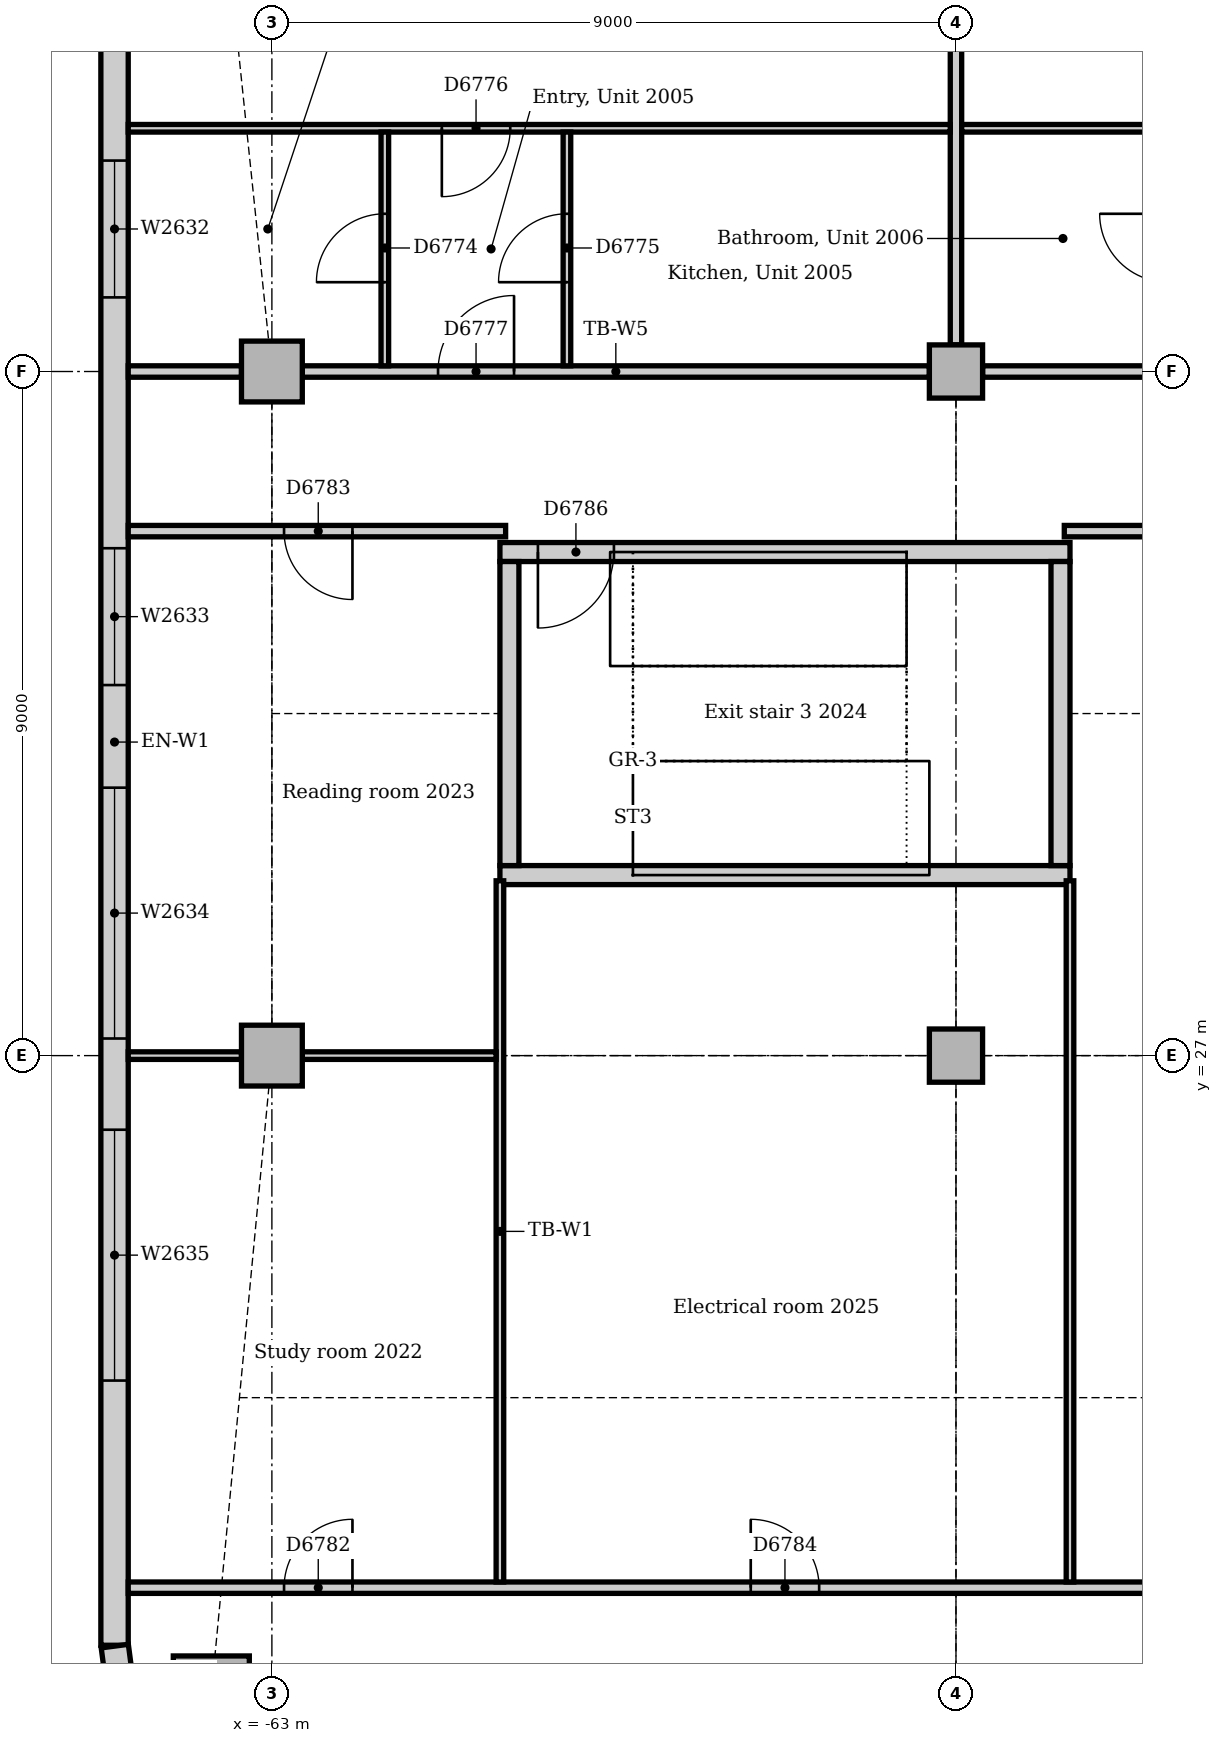
"""IFC4 building model, lengths in metres.
Left out: names, types, materials, properties, quantities, classifications, styles, units other than length and angle.
Written with IfcOpenShell. Run it as: python <this file> out.ifc"""

import sys

from ifc_helpers import new_model, si_unit, direction, frame, frame_2d, origin, origin_2d, place, context, subcontext, project, spatial, rectangle, extrude, element, fill, save


model = new_model("IFC4")
c1 = context("Model", 3, precision=1e-05, world=origin(), true_north=direction((0.0, 1.0)))
c2 = subcontext(c1, "Body", "Model", "MODEL_VIEW")
j1 = project(units=[si_unit("LENGTHUNIT", "METRE"), si_unit("PLANEANGLEUNIT", "RADIAN")], contexts=[c1])
p1 = place(None, origin())
s1 = spatial("IfcSite", under=j1, at=p1, CompositionType="ELEMENT")
p2 = place(p1, origin())
s2 = spatial("IfcBuilding", under=s1, at=p2, CompositionType="ELEMENT")
p3 = place(p2, frame((0.0, 0.0, 87.0)))
s3 = spatial("IfcBuildingStorey", under=s2, at=p3, CompositionType="ELEMENT", Elevation=87.0)
p4 = place(p3, frame((-60.0, 29.375, 0.0), z_axis=(0.0, 0.0, 1.0), x_axis=(1.0, 0.0, 0.0)))
e1 = element("IfcWall", 1, at=p4, inside=s3, PredefinedType="SOLIDWALL", context=c2, shape_type="SweptSolid", body=[
    extrude(rectangle(XDim=7.5, YDim=0.25, at=frame_2d((3.75, 0.0))), origin(), (0.0, 0.0, 1.0), 4.0),
])
p5 = place(p3, frame((-52.5, 33.625, 0.0), z_axis=(0.0, 0.0, 1.0), x_axis=(-1.0, 0.0, 0.0)))
e2 = element("IfcWall", 2, at=p5, inside=s3, PredefinedType="SOLIDWALL", context=c2, shape_type="SweptSolid", body=[
    extrude(rectangle(XDim=7.5, YDim=0.25, at=frame_2d((3.75, 0.0))), origin(), (0.0, 0.0, 1.0), 4.0),
])
p6 = place(p5, frame((6.0, 0.0, 0.0)))
e3 = element("IfcOpeningElement", 3, at=p6, cuts=e2, PredefinedType="OPENING", context=c2, shape_type="SweptSolid", body=[
    extrude(rectangle(XDim=1.0, YDim=2.1, at=frame_2d((0.5, 1.05))), frame((0.0, 0.135, 0.0), z_axis=(0.0, -1.0, 0.0), x_axis=(1.0, 0.0, 0.0)), (0.0, 0.0, 1.0), 0.27),
])
for number, where, z_axis, x_axis in (
    (4, (-52.625, 29.5, 0.0), (0.0, 0.0, 1.0), (0.0, 1.0, 0.0)),
    (5, (-59.875, 33.5, 0.0), (0.0, 0.0, 1.0), (0.0, -1.0, 0.0)),
):
    element("IfcWall", number, at=place(p3, frame(where, z_axis=z_axis, x_axis=x_axis)), inside=s3, PredefinedType="SOLIDWALL", context=c2, shape_type="SweptSolid", body=[
        extrude(rectangle(XDim=4.0, YDim=0.25, at=frame_2d((2.0, 0.0))), origin(), (0.0, 0.0, 1.0), 4.0),
    ])
p7 = place(p3, frame((-63.797, 18.602, 0.0), z_axis=(0.0, 0.0, 1.0), x_axis=(1.0, 0.0, 0.0)))
e6 = element("IfcColumn", 6, at=p7, inside=s3, PredefinedType="COLUMN", context=c2, shape_type="SweptSolid", body=[
    extrude(rectangle(XDim=1.0, YDim=1.0, at=origin_2d()), origin(), (0.0, 0.0, 1.0), 3.85),
])
for number, where, z_axis, x_axis in (
    (7, (-63.0, 27.0, 0.0), (0.0, 0.0, 1.0), (1.0, 0.0, 0.0)),
    (8, (-63.0, 36.0, 0.0), (0.0, 0.0, 1.0), (1.0, 0.0, 0.0)),
):
    element("IfcColumn", number, at=place(p3, frame(where, z_axis=z_axis, x_axis=x_axis)), inside=s3, PredefinedType="COLUMN", context=c2, shape_type="SweptSolid", body=[
        extrude(rectangle(XDim=0.8, YDim=0.8, at=origin_2d()), origin(), (0.0, 0.0, 1.0), 3.85),
    ])
for number, where, z_axis, x_axis in (
    (9, (-54.0, 27.0, 0.0), (0.0, 0.0, 1.0), (1.0, 0.0, 0.0)),
    (10, (-54.0, 36.0, 0.0), (0.0, 0.0, 1.0), (1.0, 0.0, 0.0)),
):
    element("IfcColumn", number, at=place(p3, frame(where, z_axis=z_axis, x_axis=x_axis)), inside=s3, PredefinedType="COLUMN", context=c2, shape_type="SweptSolid", body=[
        extrude(rectangle(XDim=0.7, YDim=0.7, at=origin_2d()), origin(), (0.0, 0.0, 1.0), 3.85),
    ])
p8 = place(p3, frame((-65.07, 43.007, 0.0), z_axis=(0.0, 0.0, 1.0), x_axis=(0.0, -1.0, 0.0)))
e11 = element("IfcWall", 11, at=p8, inside=s3, PredefinedType="STANDARD", context=c2, shape_type="SweptSolid", body=[
    extrude(rectangle(XDim=23.765, YDim=0.36, at=frame_2d((11.882, 0.0))), origin(), (0.0, 0.0, 1.0), 3.85),
])
p9 = place(p8, frame((4.232, 0.0, 0.9)))
e12 = element("IfcOpeningElement", 12, at=p9, cuts=e11, PredefinedType="OPENING", context=c2, shape_type="SweptSolid", body=[
    extrude(rectangle(XDim=1.8, YDim=1.6, at=frame_2d((0.9, 0.8))), frame((0.0, 0.19, 0.0), z_axis=(0.0, -1.0, 0.0), x_axis=(1.0, 0.0, 0.0)), (0.0, 0.0, 1.0), 0.38),
])
p10 = place(p8, frame((9.332, 0.0, 0.9)))
e13 = element("IfcOpeningElement", 13, at=p10, cuts=e11, PredefinedType="OPENING", context=c2, shape_type="SweptSolid", body=[
    extrude(rectangle(XDim=1.8, YDim=1.6, at=frame_2d((0.9, 0.8))), frame((0.0, 0.19, 0.0), z_axis=(0.0, -1.0, 0.0), x_axis=(1.0, 0.0, 0.0)), (0.0, 0.0, 1.0), 0.38),
])
p11 = place(p8, frame((12.482, 0.0, 0.9)))
e14 = element("IfcOpeningElement", 14, at=p11, cuts=e11, PredefinedType="OPENING", context=c2, shape_type="SweptSolid", body=[
    extrude(rectangle(XDim=3.3, YDim=1.6, at=frame_2d((1.65, 0.8))), frame((0.0, 0.19, 0.0), z_axis=(0.0, -1.0, 0.0), x_axis=(1.0, 0.0, 0.0)), (0.0, 0.0, 1.0), 0.38),
])
p12 = place(p8, frame((16.982, 0.0, 0.9)))
e15 = element("IfcOpeningElement", 15, at=p12, cuts=e11, PredefinedType="OPENING", context=c2, shape_type="SweptSolid", body=[
    extrude(rectangle(XDim=3.3, YDim=1.6, at=frame_2d((1.65, 0.8))), frame((0.0, 0.19, 0.0), z_axis=(0.0, -1.0, 0.0), x_axis=(1.0, 0.0, 0.0)), (0.0, 0.0, 1.0), 0.38),
])
p13 = place(p3, frame((-65.067, 19.231, 0.0), z_axis=(0.0, 0.0, 1.0), x_axis=(0.13055608231, -0.99144092581, 0.0)))
e16 = element("IfcWall", 16, at=p13, inside=s3, PredefinedType="STANDARD", context=c2, shape_type="SweptSolid", body=[
    extrude(rectangle(XDim=0.713, YDim=0.36, at=frame_2d((0.356, 0.0))), origin(), (0.0, 0.0, 1.0), 3.85),
])
p14 = place(p3, frame((-53.65, 36.0, 0.0), z_axis=(0.0, 0.0, 1.0), x_axis=(1.0, 0.0, 0.0)))
e17 = element("IfcWall", 17, at=p14, inside=s3, PredefinedType="PARTITIONING", context=c2, shape_type="SweptSolid", body=[
    extrude(rectangle(XDim=8.3, YDim=0.15, at=frame_2d((4.15, 0.0))), origin(), (0.0, 0.0, 1.0), 3.158),
])
p15 = place(p14, frame((2.94, 0.0, 0.0)))
e18 = element("IfcOpeningElement", 18, at=p15, cuts=e17, PredefinedType="OPENING", context=c2, shape_type="SweptSolid", body=[
    extrude(rectangle(XDim=1.0, YDim=2.1, at=frame_2d((0.5, 1.05))), frame((0.0, 0.085, 0.0), z_axis=(0.0, -1.0, 0.0), x_axis=(1.0, 0.0, 0.0)), (0.0, 0.0, 1.0), 0.17),
])
p16 = place(p3, frame((-62.6, 36.0, 0.0), z_axis=(0.0, 0.0, 1.0), x_axis=(1.0, 0.0, 0.0)))
e19 = element("IfcWall", 19, at=p16, inside=s3, PredefinedType="PARTITIONING", context=c2, shape_type="SweptSolid", body=[
    extrude(rectangle(XDim=8.25, YDim=0.15, at=frame_2d((4.125, 0.0))), origin(), (0.0, 0.0, 1.0), 3.158),
])
p17 = place(p16, frame((1.786, 0.0, 0.0)))
e20 = element("IfcOpeningElement", 20, at=p17, cuts=e19, PredefinedType="OPENING", context=c2, shape_type="SweptSolid", body=[
    extrude(rectangle(XDim=1.0, YDim=2.1, at=frame_2d((0.5, 1.05))), frame((0.0, 0.085, 0.0), z_axis=(0.0, -1.0, 0.0), x_axis=(1.0, 0.0, 0.0)), (0.0, 0.0, 1.0), 0.17),
])
p18 = place(p3, frame((-64.89, 36.0, 0.0), z_axis=(0.0, 0.0, 1.0), x_axis=(1.0, 0.0, 0.0)))
e21 = element("IfcWall", 21, at=p18, inside=s3, PredefinedType="PARTITIONING", context=c2, shape_type="SweptSolid", body=[
    extrude(rectangle(XDim=1.49, YDim=0.15, at=frame_2d((0.745, 0.0))), origin(), (0.0, 0.0, 1.0), 3.85),
])
p19 = place(p3, frame((-64.89, 20.0, 0.0), z_axis=(0.0, 0.0, 1.0), x_axis=(1.0, 0.0, 0.0)))
e22 = element("IfcWall", 22, at=p19, inside=s3, PredefinedType="PARTITIONING", context=c2, shape_type="SweptSolid", body=[
    extrude(rectangle(XDim=19.965, YDim=0.15, at=frame_2d((9.982, 0.0))), origin(), (0.0, 0.0, 1.0), 3.85),
])
p20 = place(p19, frame((2.05, 0.0, 0.0)))
e23 = element("IfcOpeningElement", 23, at=p20, cuts=e22, PredefinedType="OPENING", context=c2, shape_type="SweptSolid", body=[
    extrude(rectangle(XDim=0.9, YDim=2.1, at=frame_2d((0.45, 1.05))), frame((0.0, 0.085, 0.0), z_axis=(0.0, -1.0, 0.0), x_axis=(1.0, 0.0, 0.0)), (0.0, 0.0, 1.0), 0.17),
])
p21 = place(p19, frame((8.19, 0.0, 0.0)))
e24 = element("IfcOpeningElement", 24, at=p21, cuts=e22, PredefinedType="OPENING", context=c2, shape_type="SweptSolid", body=[
    extrude(rectangle(XDim=0.9, YDim=2.1, at=frame_2d((0.45, 1.05))), frame((0.0, 0.085, 0.0), z_axis=(0.0, -1.0, 0.0), x_axis=(1.0, 0.0, 0.0)), (0.0, 0.0, 1.0), 0.17),
])
p22 = place(p3, frame((-52.575, 33.9, 0.0), z_axis=(0.0, 0.0, 1.0), x_axis=(1.0, 0.0, 0.0)))
e25 = element("IfcWall", 25, at=p22, inside=s3, PredefinedType="PARTITIONING", context=c2, shape_type="SweptSolid", body=[
    extrude(rectangle(XDim=7.5, YDim=0.15, at=frame_2d((3.75, 0.0))), origin(), (0.0, 0.0, 1.0), 3.85),
])
p23 = place(p3, frame((-64.89, 33.9, 0.0), z_axis=(0.0, 0.0, 1.0), x_axis=(1.0, 0.0, 0.0)))
e26 = element("IfcWall", 26, at=p23, inside=s3, PredefinedType="PARTITIONING", context=c2, shape_type="SweptSolid", body=[
    extrude(rectangle(XDim=4.965, YDim=0.15, at=frame_2d((2.482, 0.0))), origin(), (0.0, 0.0, 1.0), 3.85),
])
p24 = place(p23, frame((2.05, 0.0, 0.0)))
e27 = element("IfcOpeningElement", 27, at=p24, cuts=e26, PredefinedType="OPENING", context=c2, shape_type="SweptSolid", body=[
    extrude(rectangle(XDim=0.9, YDim=2.1, at=frame_2d((0.45, 1.05))), frame((0.0, 0.085, 0.0), z_axis=(0.0, -1.0, 0.0), x_axis=(1.0, 0.0, 0.0)), (0.0, 0.0, 1.0), 0.17),
])
p25 = place(p3, frame((-54.0, 36.35, 0.0), z_axis=(0.0, 0.0, 1.0), x_axis=(0.0, 1.0, 0.0)))
e28 = element("IfcWall", 28, at=p25, inside=s3, PredefinedType="PARTITIONING", context=c2, shape_type="SweptSolid", body=[
    extrude(rectangle(XDim=9.6, YDim=0.15, at=frame_2d((4.8, 0.0))), origin(), (0.0, 0.0, 1.0), 3.256),
])
p26 = place(p3, frame((-53.925, 39.2, 0.0), z_axis=(0.0, 0.0, 1.0), x_axis=(1.0, 0.0, 0.0)))
e29 = element("IfcWall", 29, at=p26, inside=s3, PredefinedType="PARTITIONING", context=c2, shape_type="SweptSolid", body=[
    extrude(rectangle(XDim=8.975, YDim=0.1, at=frame_2d((4.487, 0.0))), origin(), (0.0, 0.0, 1.0), 3.85),
])
p27 = place(p26, frame((3.265, 0.0, 0.0)))
e30 = element("IfcOpeningElement", 30, at=p27, cuts=e29, PredefinedType="OPENING", context=c2, shape_type="SweptSolid", body=[
    extrude(rectangle(XDim=0.9, YDim=2.1, at=frame_2d((0.45, 1.05))), frame((0.0, 0.06, 0.0), z_axis=(0.0, -1.0, 0.0), x_axis=(1.0, 0.0, 0.0)), (0.0, 0.0, 1.0), 0.12),
])
p28 = place(p3, frame((-64.89, 39.2, 0.0), z_axis=(0.0, 0.0, 1.0), x_axis=(1.0, 0.0, 0.0)))
e31 = element("IfcWall", 31, at=p28, inside=s3, PredefinedType="PARTITIONING", context=c2, shape_type="SweptSolid", body=[
    extrude(rectangle(XDim=10.815, YDim=0.1, at=frame_2d((5.407, 0.0))), origin(), (0.0, 0.0, 1.0), 3.85),
])
p29 = place(p28, frame((4.126, 0.0, 0.0)))
e32 = element("IfcOpeningElement", 32, at=p29, cuts=e31, PredefinedType="OPENING", context=c2, shape_type="SweptSolid", body=[
    extrude(rectangle(XDim=0.9, YDim=2.1, at=frame_2d((0.45, 1.05))), frame((0.0, 0.06, 0.0), z_axis=(0.0, -1.0, 0.0), x_axis=(1.0, 0.0, 0.0)), (0.0, 0.0, 1.0), 0.12),
])
for number, where, z_axis, x_axis in (
    (33, (-60.0, 20.075, 0.0), (0.0, 0.0, 1.0), (0.0, 1.0, 0.0)),
    (34, (-52.5, 20.075, 0.0), (0.0, 0.0, 1.0), (0.0, 1.0, 0.0)),
):
    element("IfcWall", number, at=place(p3, frame(where, z_axis=z_axis, x_axis=x_axis)), inside=s3, PredefinedType="PARTITIONING", context=c2, shape_type="SweptSolid", body=[
        extrude(rectangle(XDim=9.225, YDim=0.1, at=frame_2d((4.612, 0.0))), origin(), (0.0, 0.0, 1.0), 3.85),
    ])
p30 = place(p3, frame((-62.6, 27.0, 0.0), z_axis=(0.0, 0.0, 1.0), x_axis=(1.0, 0.0, 0.0)))
e35 = element("IfcWall", 35, at=p30, inside=s3, PredefinedType="PARTITIONING", context=c2, shape_type="SweptSolid", body=[
    extrude(rectangle(XDim=2.55, YDim=0.1, at=frame_2d((1.275, 0.0))), origin(), (0.0, 0.0, 1.0), 3.158),
])
p31 = place(p3, frame((-64.89, 27.0, 0.0), z_axis=(0.0, 0.0, 1.0), x_axis=(1.0, 0.0, 0.0)))
e36 = element("IfcWall", 36, at=p31, inside=s3, PredefinedType="PARTITIONING", context=c2, shape_type="SweptSolid", body=[
    extrude(rectangle(XDim=1.49, YDim=0.1, at=frame_2d((0.745, 0.0))), origin(), (0.0, 0.0, 1.0), 3.85),
])
p32 = place(p3, frame((-61.514, 36.075, 0.0), z_axis=(0.0, 0.0, 1.0), x_axis=(0.0, 1.0, 0.0)))
e37 = element("IfcWall", 37, at=p32, inside=s3, PredefinedType="PARTITIONING", context=c2, shape_type="SweptSolid", body=[
    extrude(rectangle(XDim=3.075, YDim=0.1, at=frame_2d((1.538, 0.0))), origin(), (0.0, 0.0, 1.0), 3.85),
])
p33 = place(p32, frame((1.1, 0.0, 0.0)))
e38 = element("IfcOpeningElement", 38, at=p33, cuts=e37, PredefinedType="OPENING", context=c2, shape_type="SweptSolid", body=[
    extrude(rectangle(XDim=0.9, YDim=2.1, at=frame_2d((0.45, 1.05))), frame((0.0, 0.06, 0.0), z_axis=(0.0, -1.0, 0.0), x_axis=(1.0, 0.0, 0.0)), (0.0, 0.0, 1.0), 0.12),
])
p34 = place(p3, frame((-59.118, 36.075, 0.0), z_axis=(0.0, 0.0, 1.0), x_axis=(0.0, 1.0, 0.0)))
e39 = element("IfcWall", 39, at=p34, inside=s3, PredefinedType="PARTITIONING", context=c2, shape_type="SweptSolid", body=[
    extrude(rectangle(XDim=3.075, YDim=0.1, at=frame_2d((1.538, 0.0))), origin(), (0.0, 0.0, 1.0), 3.85),
])
p35 = place(p34, frame((1.1, 0.0, 0.0)))
e40 = element("IfcOpeningElement", 40, at=p35, cuts=e39, PredefinedType="OPENING", context=c2, shape_type="SweptSolid", body=[
    extrude(rectangle(XDim=0.9, YDim=2.1, at=frame_2d((0.45, 1.05))), frame((0.0, 0.06, 0.0), z_axis=(0.0, -1.0, 0.0), x_axis=(1.0, 0.0, 0.0)), (0.0, 0.0, 1.0), 0.12),
])
p36 = place(p9, origin())
e41 = element("IfcWindow", 41, at=p36, inside=s3, PartitioningType="SINGLE_PANEL", PredefinedType="WINDOW", context=c2, shape_type="SweptSolid", body=[
    extrude(rectangle(XDim=1.8, YDim=1.6, at=frame_2d((0.9, 0.8))), frame((0.0, 0.13, 0.0), z_axis=(0.0, -1.0, 0.0), x_axis=(1.0, 0.0, 0.0)), (0.0, 0.0, 1.0), 0.06),
])
fill(e12, e41)
p37 = place(p10, origin())
e42 = element("IfcWindow", 42, at=p37, inside=s3, PartitioningType="SINGLE_PANEL", PredefinedType="WINDOW", context=c2, shape_type="SweptSolid", body=[
    extrude(rectangle(XDim=1.8, YDim=1.6, at=frame_2d((0.9, 0.8))), frame((0.0, 0.13, 0.0), z_axis=(0.0, -1.0, 0.0), x_axis=(1.0, 0.0, 0.0)), (0.0, 0.0, 1.0), 0.06),
])
fill(e13, e42)
p38 = place(p11, origin())
e43 = element("IfcWindow", 43, at=p38, inside=s3, PartitioningType="SINGLE_PANEL", PredefinedType="WINDOW", context=c2, shape_type="SweptSolid", body=[
    extrude(rectangle(XDim=3.3, YDim=1.6, at=frame_2d((1.65, 0.8))), frame((0.0, 0.13, 0.0), z_axis=(0.0, -1.0, 0.0), x_axis=(1.0, 0.0, 0.0)), (0.0, 0.0, 1.0), 0.06),
])
fill(e14, e43)
p39 = place(p12, origin())
e44 = element("IfcWindow", 44, at=p39, inside=s3, PartitioningType="SINGLE_PANEL", PredefinedType="WINDOW", context=c2, shape_type="SweptSolid", body=[
    extrude(rectangle(XDim=3.3, YDim=1.6, at=frame_2d((1.65, 0.8))), frame((0.0, 0.13, 0.0), z_axis=(0.0, -1.0, 0.0), x_axis=(1.0, 0.0, 0.0)), (0.0, 0.0, 1.0), 0.06),
])
fill(e15, e44)
p40 = place(p33, origin())
e45 = element("IfcDoor", 45, at=p40, inside=s3, OperationType="SINGLE_SWING_LEFT", PredefinedType="DOOR", context=c2, shape_type="SweptSolid", body=[
    extrude(rectangle(XDim=0.9, YDim=2.1, at=frame_2d((0.45, 1.05))), frame((0.0, 0.025, 0.0), z_axis=(0.0, -1.0, 0.0), x_axis=(1.0, 0.0, 0.0)), (0.0, 0.0, 1.0), 0.05),
])
fill(e38, e45)
p41 = place(p35, origin())
e46 = element("IfcDoor", 46, at=p41, inside=s3, OperationType="SINGLE_SWING_LEFT", PredefinedType="DOOR", context=c2, shape_type="SweptSolid", body=[
    extrude(rectangle(XDim=0.9, YDim=2.1, at=frame_2d((0.45, 1.05))), frame((0.0, 0.025, 0.0), z_axis=(0.0, -1.0, 0.0), x_axis=(1.0, 0.0, 0.0)), (0.0, 0.0, 1.0), 0.05),
])
fill(e40, e46)
p42 = place(p29, frame((0.9, 0.0, 0.0), z_axis=(0.0, 0.0, 1.0), x_axis=(-1.0, 0.0, 0.0)))
e47 = element("IfcDoor", 47, at=p42, inside=s3, OperationType="SINGLE_SWING_RIGHT", PredefinedType="DOOR", context=c2, shape_type="SweptSolid", body=[
    extrude(rectangle(XDim=0.9, YDim=2.1, at=frame_2d((0.45, 1.05))), frame((0.0, 0.025, 0.0), z_axis=(0.0, -1.0, 0.0), x_axis=(1.0, 0.0, 0.0)), (0.0, 0.0, 1.0), 0.05),
])
fill(e32, e47)
p43 = place(p17, origin())
e48 = element("IfcDoor", 48, at=p43, inside=s3, OperationType="SINGLE_SWING_RIGHT", PredefinedType="DOOR", context=c2, shape_type="SweptSolid", body=[
    extrude(rectangle(XDim=1.0, YDim=2.1, at=frame_2d((0.5, 1.05))), frame((0.0, 0.025, 0.0), z_axis=(0.0, -1.0, 0.0), x_axis=(1.0, 0.0, 0.0)), (0.0, 0.0, 1.0), 0.05),
])
fill(e20, e48)
p44 = place(p20, origin())
e49 = element("IfcDoor", 49, at=p44, inside=s3, OperationType="SINGLE_SWING_RIGHT", PredefinedType="DOOR", context=c2, shape_type="SweptSolid", body=[
    extrude(rectangle(XDim=0.9, YDim=2.1, at=frame_2d((0.45, 1.05))), frame((0.0, 0.025, 0.0), z_axis=(0.0, -1.0, 0.0), x_axis=(1.0, 0.0, 0.0)), (0.0, 0.0, 1.0), 0.05),
])
fill(e23, e49)
p45 = place(p24, frame((0.9, 0.0, 0.0), z_axis=(0.0, 0.0, 1.0), x_axis=(-1.0, 0.0, 0.0)))
e50 = element("IfcDoor", 50, at=p45, inside=s3, OperationType="SINGLE_SWING_LEFT", PredefinedType="DOOR", context=c2, shape_type="SweptSolid", body=[
    extrude(rectangle(XDim=0.9, YDim=2.1, at=frame_2d((0.45, 1.05))), frame((0.0, 0.025, 0.0), z_axis=(0.0, -1.0, 0.0), x_axis=(1.0, 0.0, 0.0)), (0.0, 0.0, 1.0), 0.05),
])
fill(e27, e50)
p46 = place(p21, origin())
e51 = element("IfcDoor", 51, at=p46, inside=s3, OperationType="SINGLE_SWING_LEFT", PredefinedType="DOOR", context=c2, shape_type="SweptSolid", body=[
    extrude(rectangle(XDim=0.9, YDim=2.1, at=frame_2d((0.45, 1.05))), frame((0.0, 0.025, 0.0), z_axis=(0.0, -1.0, 0.0), x_axis=(1.0, 0.0, 0.0)), (0.0, 0.0, 1.0), 0.05),
])
fill(e24, e51)
p47 = place(p6, origin())
e52 = element("IfcDoor", 52, at=p47, inside=s3, OperationType="SINGLE_SWING_RIGHT", PredefinedType="DOOR", context=c2, shape_type="SweptSolid", body=[
    extrude(rectangle(XDim=1.0, YDim=2.1, at=frame_2d((0.5, 1.05))), frame((0.0, 0.025, 0.0), z_axis=(0.0, -1.0, 0.0), x_axis=(1.0, 0.0, 0.0)), (0.0, 0.0, 1.0), 0.05),
])
fill(e3, e52)
save(model, sys.argv[1])
